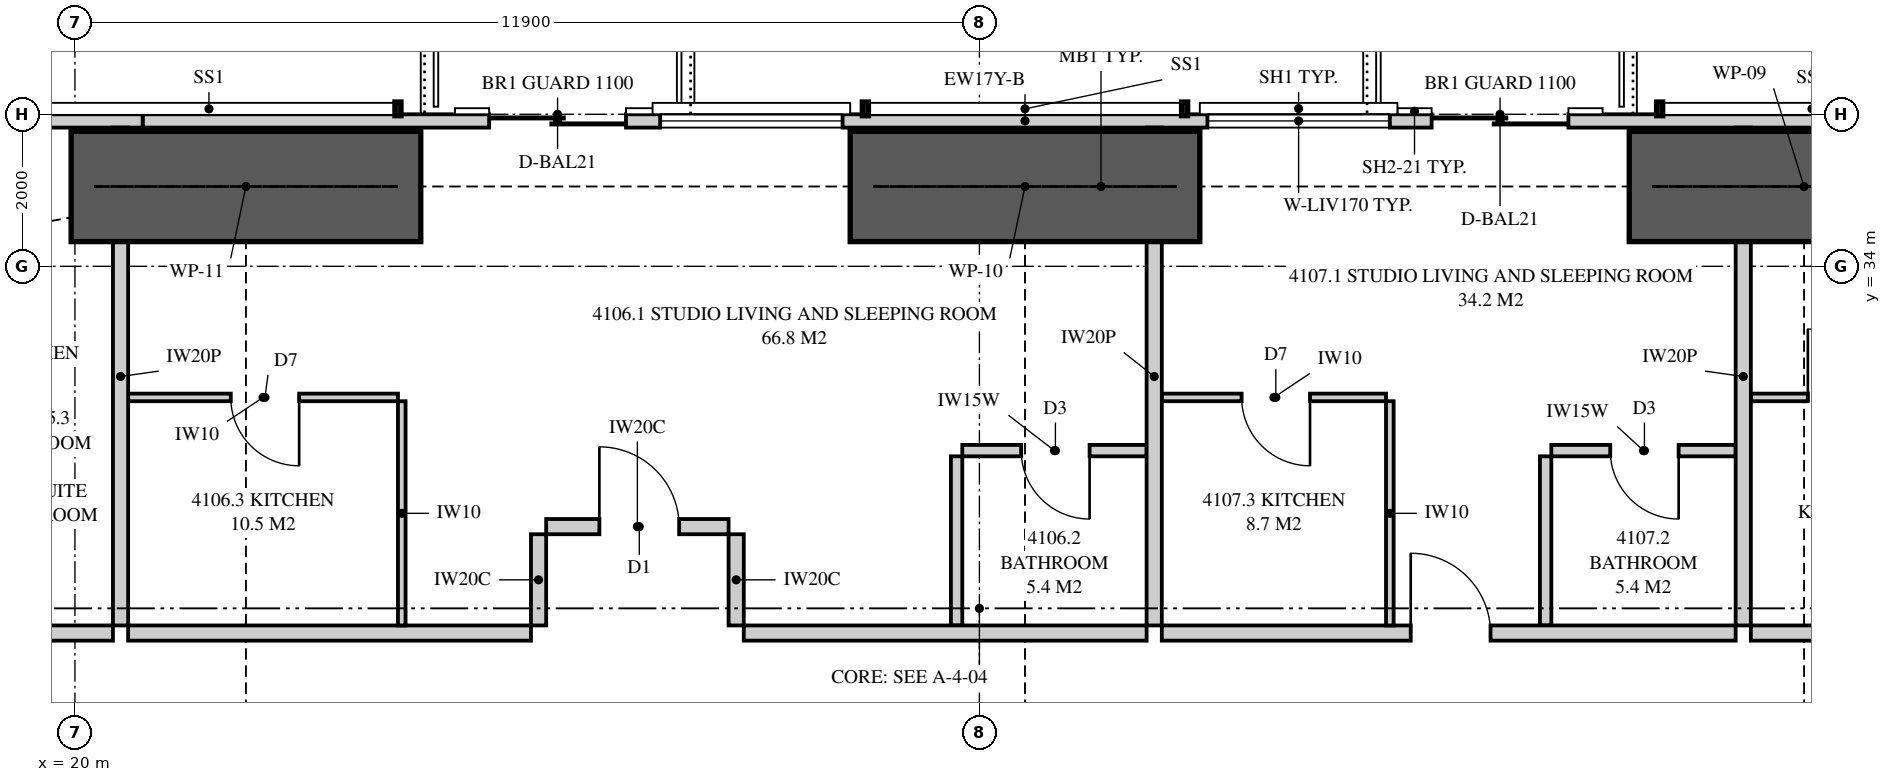
"""IFC4 building model, lengths in metres.
Left out: names, types, materials, properties, quantities, classifications, styles, units other than length and angle.
Written with IfcOpenShell. Run it as: python <this file> out.ifc"""

import sys

from ifc_helpers import new_model, si_unit, direction, frame, frame_2d, origin, place, context, subcontext, project, spatial, polyline, rectangle, outline, extrude, element, fill, save


model = new_model("IFC4")
c1 = context("Model", 3, precision=1e-05, world=origin(), true_north=direction((0.0, 1.0)))
c2 = subcontext(c1, "Body", "Model", "MODEL_VIEW")
j1 = project(units=[si_unit("LENGTHUNIT", "METRE"), si_unit("PLANEANGLEUNIT", "RADIAN")], contexts=[c1])
p1 = place(None, origin())
s1 = spatial("IfcSite", under=j1, at=p1, CompositionType="ELEMENT")
p2 = place(p1, origin())
s2 = spatial("IfcBuilding", under=s1, at=p2, CompositionType="ELEMENT")
p3 = place(p2, frame((0.0, 0.0, 154.35)))
s3 = spatial("IfcBuildingStorey", under=s2, at=p3, CompositionType="ELEMENT", Elevation=154.35)
p4 = place(p3, frame((44.109, 35.913, 0.0), z_axis=(0.0, 0.0, 1.0), x_axis=(-1.0, 0.0, 0.0)))
e1 = element("IfcWall", 1, at=p4, inside=s3, PredefinedType="SOLIDWALL", context=c2, shape_type="SweptSolid", body=[
    extrude(outline(polyline([(23.218, 2.15), (0.0, 2.15), (0.0, 0.0), (1.343, 0.0), (1.343, 0.158), (1.624, 0.302), (1.697, 0.302), (1.85, 0.0), (11.636, 0.0), (11.636, 0.178), (11.908, 0.331), (11.964, 0.331), (12.149, 0.0), (21.925, 0.0), (21.925, 0.201), (22.181, 0.358), (22.224, 0.358), (22.444, 0.0), (23.218, 0.0), (23.218, 2.15)])), frame((0.0, 0.087, 0.0), z_axis=(0.0, -1.0, 0.0), x_axis=(1.0, 0.0, 0.0)), (0.0, 0.0, 1.0), 0.175),
])
p5 = place(p4, frame((4.459, 0.0, 0.0)))
e2 = element("IfcOpeningElement", 2, at=p5, cuts=e1, PredefinedType="OPENING", context=c2, shape_type="SweptSolid", body=[
    extrude(rectangle(XDim=1.8, YDim=2.1, at=frame_2d((0.9, 1.05))), frame((0.0, 0.097, 0.0), z_axis=(0.0, -1.0, 0.0), x_axis=(1.0, 0.0, 0.0)), (0.0, 0.0, 1.0), 0.195),
])
p6 = place(p4, frame((6.809, 0.0, 0.4)))
e3 = element("IfcOpeningElement", 3, at=p6, cuts=e1, PredefinedType="OPENING", context=c2, shape_type="SweptSolid", body=[
    extrude(rectangle(XDim=2.4, YDim=1.7, at=frame_2d((1.2, 0.85))), frame((0.0, 0.097, 0.0), z_axis=(0.0, -1.0, 0.0), x_axis=(1.0, 0.0, 0.0)), (0.0, 0.0, 1.0), 0.195),
])
p7 = place(p4, frame((16.859, 0.0, 0.0)))
e4 = element("IfcOpeningElement", 4, at=p7, cuts=e1, PredefinedType="OPENING", context=c2, shape_type="SweptSolid", body=[
    extrude(rectangle(XDim=1.8, YDim=2.1, at=frame_2d((0.9, 1.05))), frame((0.0, 0.097, 0.0), z_axis=(0.0, -1.0, 0.0), x_axis=(1.0, 0.0, 0.0)), (0.0, 0.0, 1.0), 0.195),
])
p8 = place(p4, frame((14.009, 0.0, 0.4)))
e5 = element("IfcOpeningElement", 5, at=p8, cuts=e1, PredefinedType="OPENING", context=c2, shape_type="SweptSolid", body=[
    extrude(rectangle(XDim=2.4, YDim=1.7, at=frame_2d((1.2, 0.85))), frame((0.0, 0.097, 0.0), z_axis=(0.0, -1.0, 0.0), x_axis=(1.0, 0.0, 0.0)), (0.0, 0.0, 1.0), 0.195),
])
p9 = place(p3, frame((20.891, 35.913, 0.0), z_axis=(0.0, 0.0, 1.0), x_axis=(-1.0, 0.0, 0.0)))
e6 = element("IfcWall", 6, at=p9, inside=s3, PredefinedType="SOLIDWALL", context=c2, shape_type="SweptSolid", body=[
    extrude(rectangle(XDim=5.84, YDim=0.175, at=frame_2d((2.92, 0.0))), origin(), (0.0, 0.0, 1.0), 3.11),
])
p10 = place(p9, frame((1.915, 0.0, 0.4)))
e7 = element("IfcOpeningElement", 7, at=p10, cuts=e6, PredefinedType="OPENING", context=c2, shape_type="SweptSolid", body=[
    extrude(rectangle(XDim=2.4, YDim=1.7, at=frame_2d((1.2, 0.85))), frame((0.0, 0.097, 0.0), z_axis=(0.0, -1.0, 0.0), x_axis=(1.0, 0.0, 0.0)), (0.0, 0.0, 1.0), 0.195),
])
p11 = place(p3, frame((20.6, 35.825, 0.0), z_axis=(0.0, 0.0, 1.0), x_axis=(0.0, -1.0, 0.0)))
e8 = element("IfcWall", 8, at=p11, inside=s3, PredefinedType="PARTITIONING", context=c2, shape_type="SweptSolid", body=[
    extrude(outline(polyline([(0.529, 2.15), (0.0, 2.15), (0.0, 0.0), (0.529, 0.0), (0.529, 0.038), (1.021, 0.038), (1.021, 0.0), (6.55, 0.0), (6.55, 3.11), (2.194, 3.11), (2.194, 2.15), (1.021, 2.15), (1.021, 1.961), (0.529, 1.961), (0.529, 2.15)])), frame((0.0, 0.1, 0.0), z_axis=(0.0, -1.0, 0.0), x_axis=(1.0, 0.0, 0.0)), (0.0, 0.0, 1.0), 0.2),
])
p12 = place(p3, frame((17.85, 29.175, 0.0), z_axis=(0.0, 0.0, 1.0), x_axis=(1.0, 0.0, 0.0)))
e9 = element("IfcWall", 9, at=p12, inside=s3, PredefinedType="PARTITIONING", context=c2, shape_type="SweptSolid", body=[
    extrude(rectangle(XDim=2.65, YDim=0.2, at=frame_2d((1.325, 0.0))), origin(), (0.0, 0.0, 1.0), 3.11),
])
p13 = place(p12, frame((0.2, 0.0, 0.0)))
e10 = element("IfcOpeningElement", 10, at=p13, cuts=e9, PredefinedType="OPENING", context=c2, shape_type="SweptSolid", body=[
    extrude(rectangle(XDim=1.05, YDim=2.2, at=frame_2d((0.525, 1.1))), frame((0.0, 0.11, 0.0), z_axis=(0.0, -1.0, 0.0), x_axis=(1.0, 0.0, 0.0)), (0.0, 0.0, 1.0), 0.22),
])
p14 = place(p3, frame((34.2, 35.825, 0.0), z_axis=(0.0, 0.0, 1.0), x_axis=(0.0, -1.0, 0.0)))
e11 = element("IfcWall", 11, at=p14, inside=s3, PredefinedType="PARTITIONING", context=c2, shape_type="SweptSolid", body=[
    extrude(outline(polyline([(0.0, 0.0), (6.55, 0.0), (6.55, 3.11), (1.885, 3.11), (1.885, 2.15), (1.021, 2.15), (1.021, 2.005), (0.529, 2.005), (0.529, 2.15), (0.0, 2.15), (0.0, 0.0)])), frame((0.0, 0.1, 0.0), z_axis=(0.0, -1.0, 0.0), x_axis=(1.0, 0.0, 0.0)), (0.0, 0.0, 1.0), 0.2),
])
p15 = place(p3, frame((20.7, 29.175, 0.0), z_axis=(0.0, 0.0, 1.0), x_axis=(1.0, 0.0, 0.0)))
e12 = element("IfcWall", 12, at=p15, inside=s3, PredefinedType="PARTITIONING", context=c2, shape_type="SweptSolid", body=[
    extrude(outline(polyline([(0.0, 0.0), (5.3, 0.0), (5.3, 3.11), (1.896, 3.11), (1.896, 2.531), (1.204, 2.531), (1.204, 3.11), (0.0, 3.11), (0.0, 0.0)])), frame((0.0, 0.1, 0.0), z_axis=(0.0, -1.0, 0.0), x_axis=(1.0, 0.0, 0.0)), (0.0, 0.0, 1.0), 0.2),
])
p16 = place(p3, frame((31.675, 31.575, 0.0), z_axis=(0.0, 0.0, 1.0), x_axis=(1.0, 0.0, 0.0)))
e13 = element("IfcWall", 13, at=p16, inside=s3, PredefinedType="PLUMBINGWALL", context=c2, shape_type="SweptSolid", body=[
    extrude(outline(polyline([(0.0, 0.0), (2.425, 0.0), (2.425, 3.11), (1.146, 3.11), (1.146, 2.531), (0.504, 2.531), (0.504, 3.11), (0.0, 3.11), (0.0, 0.0)])), frame((0.0, 0.075, 0.0), z_axis=(0.0, -1.0, 0.0), x_axis=(1.0, 0.0, 0.0)), (0.0, 0.0, 1.0), 0.15),
])
p17 = place(p16, frame((0.775, 0.0, 0.0)))
e14 = element("IfcOpeningElement", 14, at=p17, cuts=e13, PredefinedType="OPENING", context=c2, shape_type="SweptSolid", body=[
    extrude(rectangle(XDim=0.9, YDim=2.1, at=frame_2d((0.45, 1.05))), frame((0.0, 0.085, 0.0), z_axis=(0.0, -1.0, 0.0), x_axis=(1.0, 0.0, 0.0)), (0.0, 0.0, 1.0), 0.17),
])
p18 = place(p3, frame((31.6, 31.5, 0.0), z_axis=(0.0, 0.0, 1.0), x_axis=(0.0, -1.0, 0.0)))
e15 = element("IfcWall", 15, at=p18, inside=s3, PredefinedType="PLUMBINGWALL", context=c2, shape_type="SweptSolid", body=[
    extrude(rectangle(XDim=2.225, YDim=0.15, at=frame_2d((1.113, 0.0))), origin(), (0.0, 0.0, 1.0), 3.11),
])
p19 = place(p3, frame((20.7, 32.275, 0.0), z_axis=(0.0, 0.0, 1.0), x_axis=(1.0, 0.0, 0.0)))
e16 = element("IfcWall", 16, at=p19, inside=s3, PredefinedType="PARTITIONING", context=c2, shape_type="SweptSolid", body=[
    extrude(outline(polyline([(0.0, 0.0), (3.55, 0.0), (3.55, 3.11), (1.846, 3.11), (1.846, 2.531), (1.254, 2.531), (1.254, 3.11), (0.0, 3.11), (0.0, 0.0)])), frame((0.0, 0.05, 0.0), z_axis=(0.0, -1.0, 0.0), x_axis=(1.0, 0.0, 0.0)), (0.0, 0.0, 1.0), 0.1),
])
p20 = place(p19, frame((1.35, 0.0, 0.0)))
e17 = element("IfcOpeningElement", 17, at=p20, cuts=e16, PredefinedType="OPENING", context=c2, shape_type="SweptSolid", body=[
    extrude(rectangle(XDim=0.9, YDim=2.1, at=frame_2d((0.45, 1.05))), frame((0.0, 0.06, 0.0), z_axis=(0.0, -1.0, 0.0), x_axis=(1.0, 0.0, 0.0)), (0.0, 0.0, 1.0), 0.12),
])
p21 = place(p3, frame((24.3, 32.225, 0.0), z_axis=(0.0, 0.0, 1.0), x_axis=(0.0, -1.0, 0.0)))
e18 = element("IfcWall", 18, at=p21, inside=s3, PredefinedType="PARTITIONING", context=c2, shape_type="SweptSolid", body=[
    extrude(rectangle(XDim=2.95, YDim=0.1, at=frame_2d((1.475, 0.0))), origin(), (0.0, 0.0, 1.0), 3.11),
])
p22 = place(p3, frame((41.95, 35.825, 0.0), z_axis=(0.0, 0.0, 1.0), x_axis=(0.0, -1.0, 0.0)))
e19 = element("IfcWall", 19, at=p22, inside=s3, PredefinedType="PARTITIONING", context=c2, shape_type="SweptSolid", body=[
    extrude(outline(polyline([(0.529, 2.15), (0.0, 2.15), (0.0, 0.302), (0.529, 0.302), (0.529, 0.782), (1.021, 0.782), (1.021, 0.302), (1.132, 0.302), (1.223, 0.205), (1.223, 0.0), (6.55, 0.0), (6.55, 3.11), (1.885, 3.11), (1.885, 2.15), (1.021, 2.15), (1.021, 1.218), (0.529, 1.218), (0.529, 2.15)])), frame((0.0, 0.1, 0.0), z_axis=(0.0, -1.0, 0.0), x_axis=(1.0, 0.0, 0.0)), (0.0, 0.0, 1.0), 0.2),
])
p23 = place(p3, frame((34.3, 29.175, 0.0), z_axis=(0.0, 0.0, 1.0), x_axis=(1.0, 0.0, 0.0)))
e20 = element("IfcWall", 20, at=p23, inside=s3, PredefinedType="PARTITIONING", context=c2, shape_type="SweptSolid", body=[
    extrude(rectangle(XDim=7.55, YDim=0.2, at=frame_2d((3.775, 0.0))), origin(), (0.0, 0.0, 1.0), 3.11),
])
p24 = place(p23, frame((3.275, 0.0, 0.0)))
e21 = element("IfcOpeningElement", 21, at=p24, cuts=e20, PredefinedType="OPENING", context=c2, shape_type="SweptSolid", body=[
    extrude(rectangle(XDim=1.05, YDim=2.2, at=frame_2d((0.525, 1.1))), frame((0.0, 0.11, 0.0), z_axis=(0.0, -1.0, 0.0), x_axis=(1.0, 0.0, 0.0)), (0.0, 0.0, 1.0), 0.22),
])
p25 = place(p3, frame((39.425, 31.575, 0.0), z_axis=(0.0, 0.0, 1.0), x_axis=(1.0, 0.0, 0.0)))
e22 = element("IfcWall", 22, at=p25, inside=s3, PredefinedType="PLUMBINGWALL", context=c2, shape_type="SweptSolid", body=[
    extrude(rectangle(XDim=2.425, YDim=0.15, at=frame_2d((1.212, 0.0))), origin(), (0.0, 0.0, 1.0), 3.11),
])
p26 = place(p25, frame((0.775, 0.0, 0.0)))
e23 = element("IfcOpeningElement", 23, at=p26, cuts=e22, PredefinedType="OPENING", context=c2, shape_type="SweptSolid", body=[
    extrude(rectangle(XDim=0.9, YDim=2.1, at=frame_2d((0.45, 1.05))), frame((0.0, 0.085, 0.0), z_axis=(0.0, -1.0, 0.0), x_axis=(1.0, 0.0, 0.0)), (0.0, 0.0, 1.0), 0.17),
])
p27 = place(p3, frame((39.35, 31.5, 0.0), z_axis=(0.0, 0.0, 1.0), x_axis=(0.0, -1.0, 0.0)))
e24 = element("IfcWall", 24, at=p27, inside=s3, PredefinedType="PLUMBINGWALL", context=c2, shape_type="SweptSolid", body=[
    extrude(rectangle(XDim=2.225, YDim=0.15, at=frame_2d((1.113, 0.0))), origin(), (0.0, 0.0, 1.0), 3.11),
])
p28 = place(p3, frame((34.3, 32.275, 0.0), z_axis=(0.0, 0.0, 1.0), x_axis=(1.0, 0.0, 0.0)))
e25 = element("IfcWall", 25, at=p28, inside=s3, PredefinedType="PARTITIONING", context=c2, shape_type="SweptSolid", body=[
    extrude(rectangle(XDim=2.95, YDim=0.1, at=frame_2d((1.475, 0.0))), origin(), (0.0, 0.0, 1.0), 3.11),
])
p29 = place(p28, frame((1.05, 0.0, 0.0)))
e26 = element("IfcOpeningElement", 26, at=p29, cuts=e25, PredefinedType="OPENING", context=c2, shape_type="SweptSolid", body=[
    extrude(rectangle(XDim=0.9, YDim=2.1, at=frame_2d((0.45, 1.05))), frame((0.0, 0.06, 0.0), z_axis=(0.0, -1.0, 0.0), x_axis=(1.0, 0.0, 0.0)), (0.0, 0.0, 1.0), 0.12),
])
p30 = place(p3, frame((37.3, 32.225, 0.0), z_axis=(0.0, 0.0, 1.0), x_axis=(0.0, -1.0, 0.0)))
e27 = element("IfcWall", 27, at=p30, inside=s3, PredefinedType="PARTITIONING", context=c2, shape_type="SweptSolid", body=[
    extrude(rectangle(XDim=2.95, YDim=0.1, at=frame_2d((1.475, 0.0))), origin(), (0.0, 0.0, 1.0), 3.11),
])
p31 = place(p3, frame((42.05, 29.175, 0.0), z_axis=(0.0, 0.0, 1.0), x_axis=(1.0, 0.0, 0.0)))
e28 = element("IfcWall", 28, at=p31, inside=s3, PredefinedType="PARTITIONING", context=c2, shape_type="SweptSolid", body=[
    extrude(outline(polyline([(0.0, 0.0), (3.9, 0.0), (3.9, 3.11), (1.046, 3.11), (1.046, 2.531), (0.354, 2.531), (0.354, 3.11), (0.0, 3.11), (0.0, 0.0)])), frame((0.0, 0.1, 0.0), z_axis=(0.0, -1.0, 0.0), x_axis=(1.0, 0.0, 0.0)), (0.0, 0.0, 1.0), 0.2),
])
p32 = place(p31, frame((2.7, 0.0, 0.0)))
e29 = element("IfcOpeningElement", 29, at=p32, cuts=e28, PredefinedType="OPENING", context=c2, shape_type="SweptSolid", body=[
    extrude(rectangle(XDim=1.05, YDim=2.2, at=frame_2d((0.525, 1.1))), frame((0.0, 0.11, 0.0), z_axis=(0.0, -1.0, 0.0), x_axis=(1.0, 0.0, 0.0)), (0.0, 0.0, 1.0), 0.22),
])
p33 = place(p3, frame((42.05, 32.275, 0.0), z_axis=(0.0, 0.0, 1.0), x_axis=(1.0, 0.0, 0.0)))
e30 = element("IfcWall", 30, at=p33, inside=s3, PredefinedType="PARTITIONING", context=c2, shape_type="SweptSolid", body=[
    extrude(outline(polyline([(0.0, 0.0), (2.35, 0.0), (2.35, 3.11), (0.996, 3.11), (0.996, 2.531), (0.404, 2.531), (0.404, 3.11), (0.0, 3.11), (0.0, 0.0)])), frame((0.0, 0.05, 0.0), z_axis=(0.0, -1.0, 0.0), x_axis=(1.0, 0.0, 0.0)), (0.0, 0.0, 1.0), 0.1),
])
p34 = place(p33, frame((0.75, 0.0, 0.0)))
e31 = element("IfcOpeningElement", 31, at=p34, cuts=e30, PredefinedType="OPENING", context=c2, shape_type="SweptSolid", body=[
    extrude(rectangle(XDim=0.9, YDim=2.1, at=frame_2d((0.45, 1.05))), frame((0.0, 0.06, 0.0), z_axis=(0.0, -1.0, 0.0), x_axis=(1.0, 0.0, 0.0)), (0.0, 0.0, 1.0), 0.12),
])
p35 = place(p3, frame((28.8, 29.175, 0.0), z_axis=(0.0, 0.0, 1.0), x_axis=(1.0, 0.0, 0.0)))
e32 = element("IfcWall", 32, at=p35, inside=s3, PredefinedType="PARTITIONING", context=c2, shape_type="SweptSolid", body=[
    extrude(outline(polyline([(0.0, 0.0), (5.3, 0.0), (5.3, 3.11), (4.046, 3.11), (4.046, 2.531), (3.354, 2.531), (3.354, 3.11), (0.0, 3.11), (0.0, 0.0)])), frame((0.0, 0.1, 0.0), z_axis=(0.0, -1.0, 0.0), x_axis=(1.0, 0.0, 0.0)), (0.0, 0.0, 1.0), 0.2),
])
p36 = place(p3, frame((26.2, 30.575, 0.0), z_axis=(0.0, 0.0, 1.0), x_axis=(1.0, 0.0, 0.0)))
e33 = element("IfcWall", 33, at=p36, inside=s3, PredefinedType="PARTITIONING", context=c2, shape_type="SweptSolid", body=[
    extrude(rectangle(XDim=2.4, YDim=0.2, at=frame_2d((1.2, 0.0))), origin(), (0.0, 0.0, 1.0), 3.11),
])
p37 = place(p36, frame((0.7, 0.0, 0.0)))
e34 = element("IfcOpeningElement", 34, at=p37, cuts=e33, PredefinedType="OPENING", context=c2, shape_type="SweptSolid", body=[
    extrude(rectangle(XDim=1.05, YDim=2.2, at=frame_2d((0.525, 1.1))), frame((0.0, 0.11, 0.0), z_axis=(0.0, -1.0, 0.0), x_axis=(1.0, 0.0, 0.0)), (0.0, 0.0, 1.0), 0.22),
])
for number, where, z_axis, x_axis in (
    (35, (26.1, 29.275, 0.0), (0.0, 0.0, 1.0), (0.0, 1.0, 0.0)),
    (36, (28.7, 29.275, 0.0), (0.0, 0.0, 1.0), (0.0, 1.0, 0.0)),
):
    element("IfcWall", number, at=place(p3, frame(where, z_axis=z_axis, x_axis=x_axis)), inside=s3, PredefinedType="PARTITIONING", context=c2, shape_type="SweptSolid", body=[
        extrude(rectangle(XDim=1.2, YDim=0.2, at=frame_2d((0.6, 0.0))), origin(), (0.0, 0.0, 1.0), 3.11),
    ])
for number, where, z_axis, x_axis in (
    (37, (40.45, 35.05, 0.0), (0.0, 0.0, 1.0), (1.0, 0.0, 0.0)),
    (38, (30.2, 35.05, 0.0), (0.0, 0.0, 1.0), (1.0, 0.0, 0.0)),
    (39, (19.95, 35.05, 0.0), (0.0, 0.0, 1.0), (1.0, 0.0, 0.0)),
):
    element("IfcWall", number, at=place(p3, frame(where, z_axis=z_axis, x_axis=x_axis)), inside=s3, PredefinedType="SHEAR", context=c2, shape_type="SweptSolid", body=[
        extrude(rectangle(XDim=4.6, YDim=1.45, at=frame_2d((2.3, 0.0))), origin(), (0.0, 0.0, 1.0), 3.35),
    ])
p38 = place(p5, origin())
e40 = element("IfcDoor", 40, at=p38, inside=s3, OperationType="SLIDING_TO_LEFT", PredefinedType="DOOR", context=c2, shape_type="SweptSolid", body=[
    extrude(rectangle(XDim=1.8, YDim=2.1, at=frame_2d((0.9, 1.05))), frame((0.0, 0.025, 0.0), z_axis=(0.0, -1.0, 0.0), x_axis=(1.0, 0.0, 0.0)), (0.0, 0.0, 1.0), 0.05),
])
fill(e2, e40)
p39 = place(p6, origin())
e41 = element("IfcWindow", 41, at=p39, inside=s3, PartitioningType="SINGLE_PANEL", PredefinedType="WINDOW", context=c2, shape_type="SweptSolid", body=[
    extrude(rectangle(XDim=2.4, YDim=1.7, at=frame_2d((1.2, 0.85))), frame((0.0, 0.03, 0.0), z_axis=(0.0, -1.0, 0.0), x_axis=(1.0, 0.0, 0.0)), (0.0, 0.0, 1.0), 0.06),
])
fill(e3, e41)
p40 = place(p7, origin())
e42 = element("IfcDoor", 42, at=p40, inside=s3, OperationType="SLIDING_TO_LEFT", PredefinedType="DOOR", context=c2, shape_type="SweptSolid", body=[
    extrude(rectangle(XDim=1.8, YDim=2.1, at=frame_2d((0.9, 1.05))), frame((0.0, 0.025, 0.0), z_axis=(0.0, -1.0, 0.0), x_axis=(1.0, 0.0, 0.0)), (0.0, 0.0, 1.0), 0.05),
])
fill(e4, e42)
p41 = place(p8, origin())
e43 = element("IfcWindow", 43, at=p41, inside=s3, PartitioningType="SINGLE_PANEL", PredefinedType="WINDOW", context=c2, shape_type="SweptSolid", body=[
    extrude(rectangle(XDim=2.4, YDim=1.7, at=frame_2d((1.2, 0.85))), frame((0.0, 0.03, 0.0), z_axis=(0.0, -1.0, 0.0), x_axis=(1.0, 0.0, 0.0)), (0.0, 0.0, 1.0), 0.06),
])
fill(e5, e43)
p42 = place(p37, origin())
e44 = element("IfcDoor", 44, at=p42, inside=s3, OperationType="SINGLE_SWING_LEFT", PredefinedType="DOOR", context=c2, shape_type="SweptSolid", body=[
    extrude(rectangle(XDim=1.05, YDim=2.2, at=frame_2d((0.525, 1.1))), frame((0.0, 0.025, 0.0), z_axis=(0.0, -1.0, 0.0), x_axis=(1.0, 0.0, 0.0)), (0.0, 0.0, 1.0), 0.05),
])
fill(e34, e44)
p43 = place(p17, frame((0.9, 0.0, 0.0), z_axis=(0.0, 0.0, 1.0), x_axis=(-1.0, 0.0, 0.0)))
e45 = element("IfcDoor", 45, at=p43, inside=s3, OperationType="SINGLE_SWING_LEFT", PredefinedType="DOOR", context=c2, shape_type="SweptSolid", body=[
    extrude(rectangle(XDim=0.9, YDim=2.1, at=frame_2d((0.45, 1.05))), frame((0.0, 0.025, 0.0), z_axis=(0.0, -1.0, 0.0), x_axis=(1.0, 0.0, 0.0)), (0.0, 0.0, 1.0), 0.05),
])
fill(e14, e45)
p44 = place(p20, frame((0.9, 0.0, 0.0), z_axis=(0.0, 0.0, 1.0), x_axis=(-1.0, 0.0, 0.0)))
e46 = element("IfcDoor", 46, at=p44, inside=s3, OperationType="SINGLE_SWING_LEFT", PredefinedType="DOOR", context=c2, shape_type="SweptSolid", body=[
    extrude(rectangle(XDim=0.9, YDim=2.1, at=frame_2d((0.45, 1.05))), frame((0.0, 0.025, 0.0), z_axis=(0.0, -1.0, 0.0), x_axis=(1.0, 0.0, 0.0)), (0.0, 0.0, 1.0), 0.05),
])
fill(e17, e46)
p45 = place(p24, origin())
e47 = element("IfcDoor", 47, at=p45, inside=s3, OperationType="SINGLE_SWING_LEFT", PredefinedType="DOOR", context=c2, shape_type="SweptSolid", body=[
    extrude(rectangle(XDim=1.05, YDim=2.2, at=frame_2d((0.525, 1.1))), frame((0.0, 0.025, 0.0), z_axis=(0.0, -1.0, 0.0), x_axis=(1.0, 0.0, 0.0)), (0.0, 0.0, 1.0), 0.05),
])
fill(e21, e47)
p46 = place(p26, frame((0.9, 0.0, 0.0), z_axis=(0.0, 0.0, 1.0), x_axis=(-1.0, 0.0, 0.0)))
e48 = element("IfcDoor", 48, at=p46, inside=s3, OperationType="SINGLE_SWING_LEFT", PredefinedType="DOOR", context=c2, shape_type="SweptSolid", body=[
    extrude(rectangle(XDim=0.9, YDim=2.1, at=frame_2d((0.45, 1.05))), frame((0.0, 0.025, 0.0), z_axis=(0.0, -1.0, 0.0), x_axis=(1.0, 0.0, 0.0)), (0.0, 0.0, 1.0), 0.05),
])
fill(e23, e48)
p47 = place(p29, frame((0.9, 0.0, 0.0), z_axis=(0.0, 0.0, 1.0), x_axis=(-1.0, 0.0, 0.0)))
e49 = element("IfcDoor", 49, at=p47, inside=s3, OperationType="SINGLE_SWING_LEFT", PredefinedType="DOOR", context=c2, shape_type="SweptSolid", body=[
    extrude(rectangle(XDim=0.9, YDim=2.1, at=frame_2d((0.45, 1.05))), frame((0.0, 0.025, 0.0), z_axis=(0.0, -1.0, 0.0), x_axis=(1.0, 0.0, 0.0)), (0.0, 0.0, 1.0), 0.05),
])
fill(e26, e49)
p48 = place(p34, origin())
e50 = element("IfcDoor", 50, at=p48, inside=s3, OperationType="SINGLE_SWING_LEFT", PredefinedType="DOOR", context=c2, shape_type="SweptSolid", body=[
    extrude(rectangle(XDim=0.9, YDim=2.1, at=frame_2d((0.45, 1.05))), frame((0.0, 0.025, 0.0), z_axis=(0.0, -1.0, 0.0), x_axis=(1.0, 0.0, 0.0)), (0.0, 0.0, 1.0), 0.05),
])
fill(e31, e50)
save(model, sys.argv[1])
